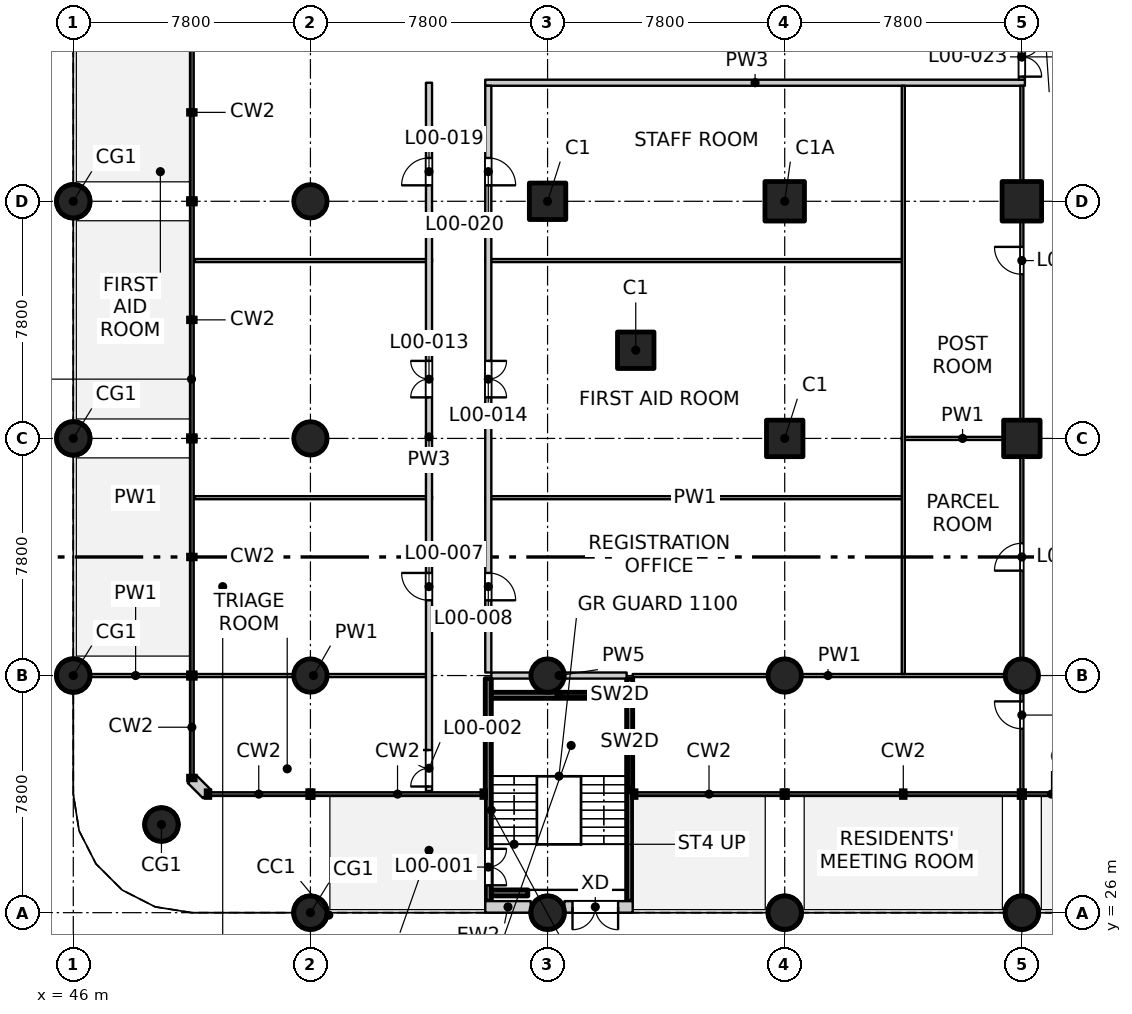
"""IFC4 building model, lengths in metres.
Left out: names, types, materials, properties, quantities, classifications, styles, units other than length and angle.
Written with IfcOpenShell. Run it as: python <this file> out.ifc"""

import sys

from ifc_helpers import new_model, si_unit, direction, frame, frame_2d, origin, origin_2d, place, context, subcontext, project, spatial, rectangle, circle, extrude, element, fill, save


model = new_model("IFC4")
c1 = context("Model", 3, precision=1e-05, world=origin(), true_north=direction((0.0, 1.0)))
c2 = subcontext(c1, "Body", "Model", "MODEL_VIEW")
j1 = project(units=[si_unit("LENGTHUNIT", "METRE"), si_unit("PLANEANGLEUNIT", "RADIAN")], contexts=[c1])
p1 = place(None, origin())
s1 = spatial("IfcSite", under=j1, at=p1, CompositionType="ELEMENT")
p2 = place(p1, origin())
s2 = spatial("IfcBuilding", under=s1, at=p2, CompositionType="ELEMENT")
p3 = place(p2, origin())
s3 = spatial("IfcBuildingStorey", under=s2, at=p3, CompositionType="ELEMENT", Elevation=0.0)
for number, where, z_axis, x_axis in (
    (1, (64.5, 44.5, -0.4), (0.0, 0.0, 1.0), (1.0, 0.0, 0.0)),
    (2, (61.6, 49.4, -0.4), (0.0, 0.0, 1.0), (1.0, 0.0, 0.0)),
    (3, (69.4, 41.6, -0.4), (0.0, 0.0, 1.0), (1.0, 0.0, 0.0)),
    (4, (77.2, 41.6, -0.4), (0.0, 0.0, 1.0), (1.0, 0.0, 0.0)),
):
    element("IfcColumn", number, at=place(p3, frame(where, z_axis=z_axis, x_axis=x_axis)), inside=s3, PredefinedType="COLUMN", context=c2, shape_type="SweptSolid", body=[
        extrude(rectangle(XDim=1.2, YDim=1.2, at=origin_2d()), origin(), (0.0, 0.0, 1.0), 6.1),
    ])
for number, where, z_axis, x_axis in (
    (5, (69.4, 49.4, -0.4), (0.0, 0.0, 1.0), (1.0, 0.0, 0.0)),
    (6, (77.2, 49.4, -0.4), (0.0, 0.0, 1.0), (1.0, 0.0, 0.0)),
):
    element("IfcColumn", number, at=place(p3, frame(where, z_axis=z_axis, x_axis=x_axis)), inside=s3, PredefinedType="COLUMN", context=c2, shape_type="SweptSolid", body=[
        extrude(rectangle(XDim=1.3, YDim=1.3, at=origin_2d()), origin(), (0.0, 0.0, 1.0), 6.1),
    ])
for number, where, z_axis, x_axis in (
    (7, (48.9, 28.9, -0.4), (0.0, 0.0, 1.0), (1.0, 0.0, 0.0)),
    (8, (46.0, 33.8, -0.4), (0.0, 0.0, 1.0), (1.0, 0.0, 0.0)),
    (9, (46.0, 41.6, -0.4), (0.0, 0.0, 1.0), (1.0, 0.0, 0.0)),
    (10, (46.0, 49.4, -0.4), (0.0, 0.0, 1.0), (1.0, 0.0, 0.0)),
    (11, (53.8, 26.0, -0.4), (0.0, 0.0, 1.0), (1.0, 0.0, 0.0)),
    (12, (53.8, 33.8, -0.4), (0.0, 0.0, 1.0), (1.0, 0.0, 0.0)),
    (13, (53.8, 41.6, -0.4), (0.0, 0.0, 1.0), (1.0, 0.0, 0.0)),
    (14, (53.8, 49.4, -0.4), (0.0, 0.0, 1.0), (1.0, 0.0, 0.0)),
    (15, (61.6, 26.0, -0.4), (0.0, 0.0, 1.0), (1.0, 0.0, 0.0)),
    (16, (61.6, 33.8, -0.4), (0.0, 0.0, 1.0), (1.0, 0.0, 0.0)),
    (17, (69.4, 26.0, -0.4), (0.0, 0.0, 1.0), (1.0, 0.0, 0.0)),
    (18, (69.4, 33.8, -0.4), (0.0, 0.0, 1.0), (1.0, 0.0, 0.0)),
    (19, (77.2, 26.0, -0.4), (0.0, 0.0, 1.0), (1.0, 0.0, 0.0)),
    (20, (77.2, 33.8, -0.4), (0.0, 0.0, 1.0), (1.0, 0.0, 0.0)),
):
    element("IfcColumn", number, at=place(p3, frame(where, z_axis=z_axis, x_axis=x_axis)), inside=s3, PredefinedType="COLUMN", context=c2, shape_type="SweptSolid", body=[
        extrude(circle(Radius=0.55, at=origin_2d()), origin(), (0.0, 0.0, 1.0), 6.1),
    ])
p4 = place(p3, frame((59.65, 26.38, 0.0), z_axis=(0.0, 0.0, 1.0), x_axis=(0.0, 1.0, 0.0)))
e21 = element("IfcWall", 21, at=p4, inside=s3, PredefinedType="SOLIDWALL", context=c2, shape_type="SweptSolid", body=[
    extrude(rectangle(XDim=7.32, YDim=0.2, at=frame_2d((3.66, 0.0))), origin(), (0.0, 0.0, 1.0), 5.7),
])
p5 = place(p4, frame((0.52, 0.0, 0.0)))
e22 = element("IfcOpeningElement", 22, at=p5, cuts=e21, PredefinedType="OPENING", context=c2, shape_type="SweptSolid", body=[
    extrude(rectangle(XDim=1.2, YDim=2.1, at=frame_2d((0.6, 1.05))), frame((0.0, 0.11, 0.0), z_axis=(0.0, -1.0, 0.0), x_axis=(1.0, 0.0, 0.0)), (0.0, 0.0, 1.0), 0.22),
])
p6 = place(p3, frame((64.3, 26.38, 0.0), z_axis=(0.0, 0.0, 1.0), x_axis=(0.0, 1.0, 0.0)))
e23 = element("IfcWall", 23, at=p6, inside=s3, PredefinedType="SOLIDWALL", context=c2, shape_type="SweptSolid", body=[
    extrude(rectangle(XDim=7.32, YDim=0.2, at=frame_2d((3.66, 0.0))), origin(), (0.0, 0.0, 1.0), 5.7),
])
p7 = place(p3, frame((59.75, 33.15, 0.0), z_axis=(0.0, 0.0, 1.0), x_axis=(1.0, 0.0, 0.0)))
e24 = element("IfcWall", 24, at=p7, inside=s3, PredefinedType="SOLIDWALL", context=c2, shape_type="SweptSolid", body=[
    extrude(rectangle(XDim=4.45, YDim=0.2, at=frame_2d((2.225, 0.0))), origin(), (0.0, 0.0, 1.0), 5.7),
])
p8 = place(p3, frame((59.75, 26.65, 0.0), z_axis=(0.0, 0.0, 1.0), x_axis=(1.0, 0.0, 0.0)))
e25 = element("IfcWall", 25, at=p8, inside=s3, PredefinedType="SOLIDWALL", context=c2, shape_type="SweptSolid", body=[
    extrude(rectangle(XDim=1.2, YDim=0.2, at=frame_2d((0.6, 0.0))), origin(), (0.0, 0.0, 1.0), 5.7),
])
p9 = place(p3, frame((59.55, 26.19, 0.0), z_axis=(0.0, 0.0, 1.0), x_axis=(1.0, 0.0, 0.0)))
e26 = element("IfcWall", 26, at=p9, inside=s3, PredefinedType="SOLIDWALL", context=c2, shape_type="SweptSolid", body=[
    extrude(rectangle(XDim=1.497, YDim=0.38, at=frame_2d((0.749, 0.0))), origin(), (0.0, 0.0, 1.0), 5.7),
])
p10 = place(p3, frame((62.153, 26.19, 0.0), z_axis=(0.0, 0.0, 1.0), x_axis=(1.0, 0.0, 0.0)))
e27 = element("IfcWall", 27, at=p10, inside=s3, PredefinedType="SOLIDWALL", context=c2, shape_type="SweptSolid", body=[
    extrude(rectangle(XDim=2.247, YDim=0.38, at=frame_2d((1.124, 0.0))), origin(), (0.0, 0.0, 1.0), 5.7),
])
p11 = place(p10, frame((0.267, 0.0, 0.0)))
e28 = element("IfcOpeningElement", 28, at=p11, cuts=e27, PredefinedType="OPENING", context=c2, shape_type="SweptSolid", body=[
    extrude(rectangle(XDim=1.5, YDim=2.4, at=frame_2d((0.75, 1.2))), frame((0.0, 0.2, 0.0), z_axis=(0.0, -1.0, 0.0), x_axis=(1.0, 0.0, 0.0)), (0.0, 0.0, 1.0), 0.4),
])
p12 = place(p3, frame((50.4, 29.9, 0.0), z_axis=(0.0, 0.0, 1.0), x_axis=(-0.707106781187, 0.707106781187, 0.0)))
e29 = element("IfcWall", 29, at=p12, inside=s3, PredefinedType="SOLIDWALL", context=c2, shape_type="SweptSolid", body=[
    extrude(rectangle(XDim=0.707, YDim=0.38, at=frame_2d((0.354, 0.0))), origin(), (0.0, 0.0, 1.0), 5.7),
])
p13 = place(p3, frame((46.3, 33.8, 0.0), z_axis=(0.0, 0.0, 1.0), x_axis=(1.0, 0.0, 0.0)))
e30 = element("IfcWall", 30, at=p13, inside=s3, PredefinedType="PARTITIONING", context=c2, shape_type="SweptSolid", body=[
    extrude(rectangle(XDim=3.5, YDim=0.1, at=frame_2d((1.75, 0.0))), origin(), (0.0, 0.0, 1.0), 5.7),
])
p14 = place(p3, frame((50.0, 33.8, 0.0), z_axis=(0.0, 0.0, 1.0), x_axis=(1.0, 0.0, 0.0)))
e31 = element("IfcWall", 31, at=p14, inside=s3, PredefinedType="PARTITIONING", context=c2, shape_type="SweptSolid", body=[
    extrude(rectangle(XDim=7.8, YDim=0.1, at=frame_2d((3.9, 0.0))), origin(), (0.0, 0.0, 1.0), 5.7),
])
p15 = place(p3, frame((59.75, 33.8, 0.0), z_axis=(0.0, 0.0, 1.0), x_axis=(1.0, 0.0, 0.0)))
e32 = element("IfcWall", 32, at=p15, inside=s3, PredefinedType="PARTITIONING", context=c2, shape_type="SweptSolid", body=[
    extrude(rectangle(XDim=4.45, YDim=0.2, at=frame_2d((2.225, 0.0))), origin(), (0.0, 0.0, 1.0), 5.7),
])
p16 = place(p3, frame((64.4, 33.8, 0.0), z_axis=(0.0, 0.0, 1.0), x_axis=(1.0, 0.0, 0.0)))
e33 = element("IfcWall", 33, at=p16, inside=s3, PredefinedType="PARTITIONING", context=c2, shape_type="SweptSolid", body=[
    extrude(rectangle(XDim=12.85, YDim=0.1, at=frame_2d((6.425, 0.0))), origin(), (0.0, 0.0, 1.0), 5.7),
])
p17 = place(p3, frame((46.3, 39.65, 0.0), z_axis=(0.0, 0.0, 1.0), x_axis=(1.0, 0.0, 0.0)))
e34 = element("IfcWall", 34, at=p17, inside=s3, PredefinedType="PARTITIONING", context=c2, shape_type="SweptSolid", body=[
    extrude(rectangle(XDim=3.5, YDim=0.1, at=frame_2d((1.75, 0.0))), origin(), (0.0, 0.0, 1.0), 5.7),
])
p18 = place(p3, frame((50.0, 39.65, 0.0), z_axis=(0.0, 0.0, 1.0), x_axis=(1.0, 0.0, 0.0)))
e35 = element("IfcWall", 35, at=p18, inside=s3, PredefinedType="PARTITIONING", context=c2, shape_type="SweptSolid", body=[
    extrude(rectangle(XDim=7.8, YDim=0.1, at=frame_2d((3.9, 0.0))), origin(), (0.0, 0.0, 1.0), 5.7),
])
p19 = place(p3, frame((59.55, 39.65, 0.0), z_axis=(0.0, 0.0, 1.0), x_axis=(1.0, 0.0, 0.0)))
e36 = element("IfcWall", 36, at=p19, inside=s3, PredefinedType="PARTITIONING", context=c2, shape_type="SweptSolid", body=[
    extrude(rectangle(XDim=13.8, YDim=0.1, at=frame_2d((6.9, 0.0))), origin(), (0.0, 0.0, 1.0), 5.7),
])
p20 = place(p3, frame((73.25, 41.6, 0.0), z_axis=(0.0, 0.0, 1.0), x_axis=(1.0, 0.0, 0.0)))
e37 = element("IfcWall", 37, at=p20, inside=s3, PredefinedType="PARTITIONING", context=c2, shape_type="SweptSolid", body=[
    extrude(rectangle(XDim=4.0, YDim=0.1, at=frame_2d((2.0, 0.0))), origin(), (0.0, 0.0, 1.0), 5.7),
])
p21 = place(p3, frame((46.3, 47.45, 0.0), z_axis=(0.0, 0.0, 1.0), x_axis=(1.0, 0.0, 0.0)))
e38 = element("IfcWall", 38, at=p21, inside=s3, PredefinedType="PARTITIONING", context=c2, shape_type="SweptSolid", body=[
    extrude(rectangle(XDim=3.5, YDim=0.1, at=frame_2d((1.75, 0.0))), origin(), (0.0, 0.0, 1.0), 5.7),
])
p22 = place(p3, frame((50.0, 47.45, 0.0), z_axis=(0.0, 0.0, 1.0), x_axis=(1.0, 0.0, 0.0)))
e39 = element("IfcWall", 39, at=p22, inside=s3, PredefinedType="PARTITIONING", context=c2, shape_type="SweptSolid", body=[
    extrude(rectangle(XDim=7.8, YDim=0.1, at=frame_2d((3.9, 0.0))), origin(), (0.0, 0.0, 1.0), 5.7),
])
p23 = place(p3, frame((59.55, 47.45, 0.0), z_axis=(0.0, 0.0, 1.0), x_axis=(1.0, 0.0, 0.0)))
e40 = element("IfcWall", 40, at=p23, inside=s3, PredefinedType="PARTITIONING", context=c2, shape_type="SweptSolid", body=[
    extrude(rectangle(XDim=13.8, YDim=0.1, at=frame_2d((6.9, 0.0))), origin(), (0.0, 0.0, 1.0), 5.7),
])
p24 = place(p3, frame((59.55, 53.3, 0.0), z_axis=(0.0, 0.0, 1.0), x_axis=(1.0, 0.0, 0.0)))
e41 = element("IfcWall", 41, at=p24, inside=s3, PredefinedType="PARTITIONING", context=c2, shape_type="SweptSolid", body=[
    extrude(rectangle(XDim=17.75, YDim=0.2, at=frame_2d((8.875, 0.0))), origin(), (0.0, 0.0, 1.0), 5.7),
])
p25 = place(p3, frame((57.7, 26.3, 0.0), z_axis=(0.0, 0.0, 1.0), x_axis=(0.0, 1.0, 0.0)))
e42 = element("IfcWall", 42, at=p25, inside=s3, PredefinedType="PARTITIONING", context=c2, shape_type="SweptSolid", body=[
    extrude(rectangle(XDim=3.5, YDim=0.2, at=frame_2d((1.75, 0.0))), origin(), (0.0, 0.0, 1.0), 5.7),
])
p26 = place(p3, frame((57.7, 30.0, 0.0), z_axis=(0.0, 0.0, 1.0), x_axis=(0.0, 1.0, 0.0)))
e43 = element("IfcWall", 43, at=p26, inside=s3, PredefinedType="PARTITIONING", context=c2, shape_type="SweptSolid", body=[
    extrude(rectangle(XDim=23.3, YDim=0.2, at=frame_2d((11.65, 0.0))), origin(), (0.0, 0.0, 1.0), 5.7),
])
p27 = place(p26, frame((0.15, 0.0, 0.0)))
e44 = element("IfcOpeningElement", 44, at=p27, cuts=e43, PredefinedType="OPENING", context=c2, shape_type="SweptSolid", body=[
    extrude(rectangle(XDim=1.2, YDim=2.1, at=frame_2d((0.6, 1.05))), frame((0.0, 0.11, 0.0), z_axis=(0.0, -1.0, 0.0), x_axis=(1.0, 0.0, 0.0)), (0.0, 0.0, 1.0), 0.22),
])
p28 = place(p26, frame((6.275, 0.0, 0.0)))
e45 = element("IfcOpeningElement", 45, at=p28, cuts=e43, PredefinedType="OPENING", context=c2, shape_type="SweptSolid", body=[
    extrude(rectangle(XDim=0.9, YDim=2.1, at=frame_2d((0.45, 1.05))), frame((0.0, 0.11, 0.0), z_axis=(0.0, -1.0, 0.0), x_axis=(1.0, 0.0, 0.0)), (0.0, 0.0, 1.0), 0.22),
])
p29 = place(p26, frame((12.95, 0.0, 0.0)))
e46 = element("IfcOpeningElement", 46, at=p29, cuts=e43, PredefinedType="OPENING", context=c2, shape_type="SweptSolid", body=[
    extrude(rectangle(XDim=1.2, YDim=2.1, at=frame_2d((0.6, 1.05))), frame((0.0, 0.11, 0.0), z_axis=(0.0, -1.0, 0.0), x_axis=(1.0, 0.0, 0.0)), (0.0, 0.0, 1.0), 0.22),
])
p30 = place(p26, frame((19.925, 0.0, 0.0)))
e47 = element("IfcOpeningElement", 47, at=p30, cuts=e43, PredefinedType="OPENING", context=c2, shape_type="SweptSolid", body=[
    extrude(rectangle(XDim=0.9, YDim=2.1, at=frame_2d((0.45, 1.05))), frame((0.0, 0.11, 0.0), z_axis=(0.0, -1.0, 0.0), x_axis=(1.0, 0.0, 0.0)), (0.0, 0.0, 1.0), 0.22),
])
p31 = place(p3, frame((59.65, 33.9, 0.0), z_axis=(0.0, 0.0, 1.0), x_axis=(0.0, 1.0, 0.0)))
e48 = element("IfcWall", 48, at=p31, inside=s3, PredefinedType="PARTITIONING", context=c2, shape_type="SweptSolid", body=[
    extrude(rectangle(XDim=19.3, YDim=0.2, at=frame_2d((9.65, 0.0))), origin(), (0.0, 0.0, 1.0), 5.7),
])
p32 = place(p31, frame((2.375, 0.0, 0.0)))
e49 = element("IfcOpeningElement", 49, at=p32, cuts=e48, PredefinedType="OPENING", context=c2, shape_type="SweptSolid", body=[
    extrude(rectangle(XDim=0.9, YDim=2.1, at=frame_2d((0.45, 1.05))), frame((0.0, 0.11, 0.0), z_axis=(0.0, -1.0, 0.0), x_axis=(1.0, 0.0, 0.0)), (0.0, 0.0, 1.0), 0.22),
])
p33 = place(p31, frame((9.05, 0.0, 0.0)))
e50 = element("IfcOpeningElement", 50, at=p33, cuts=e48, PredefinedType="OPENING", context=c2, shape_type="SweptSolid", body=[
    extrude(rectangle(XDim=1.2, YDim=2.1, at=frame_2d((0.6, 1.05))), frame((0.0, 0.11, 0.0), z_axis=(0.0, -1.0, 0.0), x_axis=(1.0, 0.0, 0.0)), (0.0, 0.0, 1.0), 0.22),
])
p34 = place(p31, frame((16.025, 0.0, 0.0)))
e51 = element("IfcOpeningElement", 51, at=p34, cuts=e48, PredefinedType="OPENING", context=c2, shape_type="SweptSolid", body=[
    extrude(rectangle(XDim=0.9, YDim=2.1, at=frame_2d((0.45, 1.05))), frame((0.0, 0.11, 0.0), z_axis=(0.0, -1.0, 0.0), x_axis=(1.0, 0.0, 0.0)), (0.0, 0.0, 1.0), 0.22),
])
p35 = place(p3, frame((73.3, 33.85, 0.0), z_axis=(0.0, 0.0, 1.0), x_axis=(0.0, 1.0, 0.0)))
e52 = element("IfcWall", 52, at=p35, inside=s3, PredefinedType="PARTITIONING", context=c2, shape_type="SweptSolid", body=[
    extrude(rectangle(XDim=19.35, YDim=0.1, at=frame_2d((9.675, 0.0))), origin(), (0.0, 0.0, 1.0), 5.7),
])
p36 = place(p3, frame((77.2, 26.3, 0.0), z_axis=(0.0, 0.0, 1.0), x_axis=(0.0, 1.0, 0.0)))
e53 = element("IfcWall", 53, at=p36, inside=s3, PredefinedType="PARTITIONING", context=c2, shape_type="SweptSolid", body=[
    extrude(rectangle(XDim=3.5, YDim=0.1, at=frame_2d((1.75, 0.0))), origin(), (0.0, 0.0, 1.0), 5.7),
])
p37 = place(p3, frame((77.2, 30.0, 0.0), z_axis=(0.0, 0.0, 1.0), x_axis=(0.0, 1.0, 0.0)))
e54 = element("IfcWall", 54, at=p37, inside=s3, PredefinedType="PARTITIONING", context=c2, shape_type="SweptSolid", body=[
    extrude(rectangle(XDim=23.2, YDim=0.1, at=frame_2d((11.6, 0.0))), origin(), (0.0, 0.0, 1.0), 5.7),
])
p38 = place(p37, frame((2.05, 0.0, 0.0)))
e55 = element("IfcOpeningElement", 55, at=p38, cuts=e54, PredefinedType="OPENING", context=c2, shape_type="SweptSolid", body=[
    extrude(rectangle(XDim=0.9, YDim=2.1, at=frame_2d((0.45, 1.05))), frame((0.0, 0.06, 0.0), z_axis=(0.0, -1.0, 0.0), x_axis=(1.0, 0.0, 0.0)), (0.0, 0.0, 1.0), 0.12),
])
p39 = place(p37, frame((7.25, 0.0, 0.0)))
e56 = element("IfcOpeningElement", 56, at=p39, cuts=e54, PredefinedType="OPENING", context=c2, shape_type="SweptSolid", body=[
    extrude(rectangle(XDim=0.9, YDim=2.1, at=frame_2d((0.45, 1.05))), frame((0.0, 0.06, 0.0), z_axis=(0.0, -1.0, 0.0), x_axis=(1.0, 0.0, 0.0)), (0.0, 0.0, 1.0), 0.12),
])
p40 = place(p37, frame((17.0, 0.0, 0.0)))
e57 = element("IfcOpeningElement", 57, at=p40, cuts=e54, PredefinedType="OPENING", context=c2, shape_type="SweptSolid", body=[
    extrude(rectangle(XDim=0.9, YDim=2.1, at=frame_2d((0.45, 1.05))), frame((0.0, 0.06, 0.0), z_axis=(0.0, -1.0, 0.0), x_axis=(1.0, 0.0, 0.0)), (0.0, 0.0, 1.0), 0.12),
])
p41 = place(p3, frame((77.2, 53.4, 0.0), z_axis=(0.0, 0.0, 1.0), x_axis=(0.0, 1.0, 0.0)))
e58 = element("IfcWall", 58, at=p41, inside=s3, PredefinedType="PARTITIONING", context=c2, shape_type="SweptSolid", body=[
    extrude(rectangle(XDim=1.5, YDim=0.2, at=frame_2d((0.75, 0.0))), origin(), (0.0, 0.0, 1.0), 5.7),
])
p42 = place(p41, frame((0.1, 0.0, 0.0)))
e59 = element("IfcOpeningElement", 59, at=p42, cuts=e58, PredefinedType="OPENING", context=c2, shape_type="SweptSolid", body=[
    extrude(rectangle(XDim=1.3, YDim=2.1, at=frame_2d((0.65, 1.05))), frame((0.0, 0.11, 0.0), z_axis=(0.0, -1.0, 0.0), x_axis=(1.0, 0.0, 0.0)), (0.0, 0.0, 1.0), 0.22),
])
p43 = place(p11, frame((1.5, 0.0, 0.0), z_axis=(0.0, 0.0, 1.0), x_axis=(-1.0, 0.0, 0.0)))
e60 = element("IfcDoor", 60, at=p43, inside=s3, OperationType="DOUBLE_DOOR_SINGLE_SWING", PredefinedType="DOOR", context=c2, shape_type="SweptSolid", body=[
    extrude(rectangle(XDim=1.5, YDim=2.4, at=frame_2d((0.75, 1.2))), frame((0.0, 0.025, 0.0), z_axis=(0.0, -1.0, 0.0), x_axis=(1.0, 0.0, 0.0)), (0.0, 0.0, 1.0), 0.05),
])
fill(e28, e60)
p44 = place(p5, origin())
e61 = element("IfcDoor", 61, at=p44, inside=s3, OperationType="DOUBLE_DOOR_SINGLE_SWING", PredefinedType="DOOR", context=c2, shape_type="SweptSolid", body=[
    extrude(rectangle(XDim=1.2, YDim=2.1, at=frame_2d((0.6, 1.05))), frame((0.0, 0.025, 0.0), z_axis=(0.0, -1.0, 0.0), x_axis=(1.0, 0.0, 0.0)), (0.0, 0.0, 1.0), 0.05),
])
fill(e22, e61)
p45 = place(p27, origin())
e62 = element("IfcDoor", 62, at=p45, inside=s3, OperationType="DOUBLE_DOOR_SINGLE_SWING", PredefinedType="DOOR", context=c2, shape_type="SweptSolid", body=[
    extrude(rectangle(XDim=1.2, YDim=2.1, at=frame_2d((0.6, 1.05))), frame((0.0, 0.025, 0.0), z_axis=(0.0, -1.0, 0.0), x_axis=(1.0, 0.0, 0.0)), (0.0, 0.0, 1.0), 0.05),
])
fill(e44, e62)
p46 = place(p38, origin())
e63 = element("IfcDoor", 63, at=p46, inside=s3, OperationType="SINGLE_SWING_RIGHT", PredefinedType="DOOR", context=c2, shape_type="SweptSolid", body=[
    extrude(rectangle(XDim=0.9, YDim=2.1, at=frame_2d((0.45, 1.05))), frame((0.0, 0.025, 0.0), z_axis=(0.0, -1.0, 0.0), x_axis=(1.0, 0.0, 0.0)), (0.0, 0.0, 1.0), 0.05),
])
fill(e55, e63)
p47 = place(p28, origin())
e64 = element("IfcDoor", 64, at=p47, inside=s3, OperationType="SINGLE_SWING_RIGHT", PredefinedType="DOOR", context=c2, shape_type="SweptSolid", body=[
    extrude(rectangle(XDim=0.9, YDim=2.1, at=frame_2d((0.45, 1.05))), frame((0.0, 0.025, 0.0), z_axis=(0.0, -1.0, 0.0), x_axis=(1.0, 0.0, 0.0)), (0.0, 0.0, 1.0), 0.05),
])
fill(e45, e64)
p48 = place(p32, origin())
e65 = element("IfcDoor", 65, at=p48, inside=s3, OperationType="SINGLE_SWING_RIGHT", PredefinedType="DOOR", context=c2, shape_type="SweptSolid", body=[
    extrude(rectangle(XDim=0.9, YDim=2.1, at=frame_2d((0.45, 1.05))), frame((0.0, 0.025, 0.0), z_axis=(0.0, -1.0, 0.0), x_axis=(1.0, 0.0, 0.0)), (0.0, 0.0, 1.0), 0.05),
])
fill(e49, e65)
p49 = place(p39, origin())
e66 = element("IfcDoor", 66, at=p49, inside=s3, OperationType="SINGLE_SWING_LEFT", PredefinedType="DOOR", context=c2, shape_type="SweptSolid", body=[
    extrude(rectangle(XDim=0.9, YDim=2.1, at=frame_2d((0.45, 1.05))), frame((0.0, 0.025, 0.0), z_axis=(0.0, -1.0, 0.0), x_axis=(1.0, 0.0, 0.0)), (0.0, 0.0, 1.0), 0.05),
])
fill(e56, e66)
p50 = place(p29, origin())
e67 = element("IfcDoor", 67, at=p50, inside=s3, OperationType="DOUBLE_DOOR_SINGLE_SWING", PredefinedType="DOOR", context=c2, shape_type="SweptSolid", body=[
    extrude(rectangle(XDim=1.2, YDim=2.1, at=frame_2d((0.6, 1.05))), frame((0.0, 0.025, 0.0), z_axis=(0.0, -1.0, 0.0), x_axis=(1.0, 0.0, 0.0)), (0.0, 0.0, 1.0), 0.05),
])
fill(e46, e67)
p51 = place(p33, origin())
e68 = element("IfcDoor", 68, at=p51, inside=s3, OperationType="DOUBLE_DOOR_SINGLE_SWING", PredefinedType="DOOR", context=c2, shape_type="SweptSolid", body=[
    extrude(rectangle(XDim=1.2, YDim=2.1, at=frame_2d((0.6, 1.05))), frame((0.0, 0.025, 0.0), z_axis=(0.0, -1.0, 0.0), x_axis=(1.0, 0.0, 0.0)), (0.0, 0.0, 1.0), 0.05),
])
fill(e50, e68)
p52 = place(p40, origin())
e69 = element("IfcDoor", 69, at=p52, inside=s3, OperationType="SINGLE_SWING_RIGHT", PredefinedType="DOOR", context=c2, shape_type="SweptSolid", body=[
    extrude(rectangle(XDim=0.9, YDim=2.1, at=frame_2d((0.45, 1.05))), frame((0.0, 0.025, 0.0), z_axis=(0.0, -1.0, 0.0), x_axis=(1.0, 0.0, 0.0)), (0.0, 0.0, 1.0), 0.05),
])
fill(e57, e69)
p53 = place(p30, origin())
e70 = element("IfcDoor", 70, at=p53, inside=s3, OperationType="SINGLE_SWING_LEFT", PredefinedType="DOOR", context=c2, shape_type="SweptSolid", body=[
    extrude(rectangle(XDim=0.9, YDim=2.1, at=frame_2d((0.45, 1.05))), frame((0.0, 0.025, 0.0), z_axis=(0.0, -1.0, 0.0), x_axis=(1.0, 0.0, 0.0)), (0.0, 0.0, 1.0), 0.05),
])
fill(e47, e70)
p54 = place(p34, origin())
e71 = element("IfcDoor", 71, at=p54, inside=s3, OperationType="SINGLE_SWING_RIGHT", PredefinedType="DOOR", context=c2, shape_type="SweptSolid", body=[
    extrude(rectangle(XDim=0.9, YDim=2.1, at=frame_2d((0.45, 1.05))), frame((0.0, 0.025, 0.0), z_axis=(0.0, -1.0, 0.0), x_axis=(1.0, 0.0, 0.0)), (0.0, 0.0, 1.0), 0.05),
])
fill(e51, e71)
p55 = place(p42, origin())
e72 = element("IfcDoor", 72, at=p55, inside=s3, OperationType="DOUBLE_DOOR_SINGLE_SWING", PredefinedType="DOOR", context=c2, shape_type="SweptSolid", body=[
    extrude(rectangle(XDim=1.3, YDim=2.1, at=frame_2d((0.65, 1.05))), frame((0.0, 0.025, 0.0), z_axis=(0.0, -1.0, 0.0), x_axis=(1.0, 0.0, 0.0)), (0.0, 0.0, 1.0), 0.05),
])
fill(e59, e72)
save(model, sys.argv[1])
